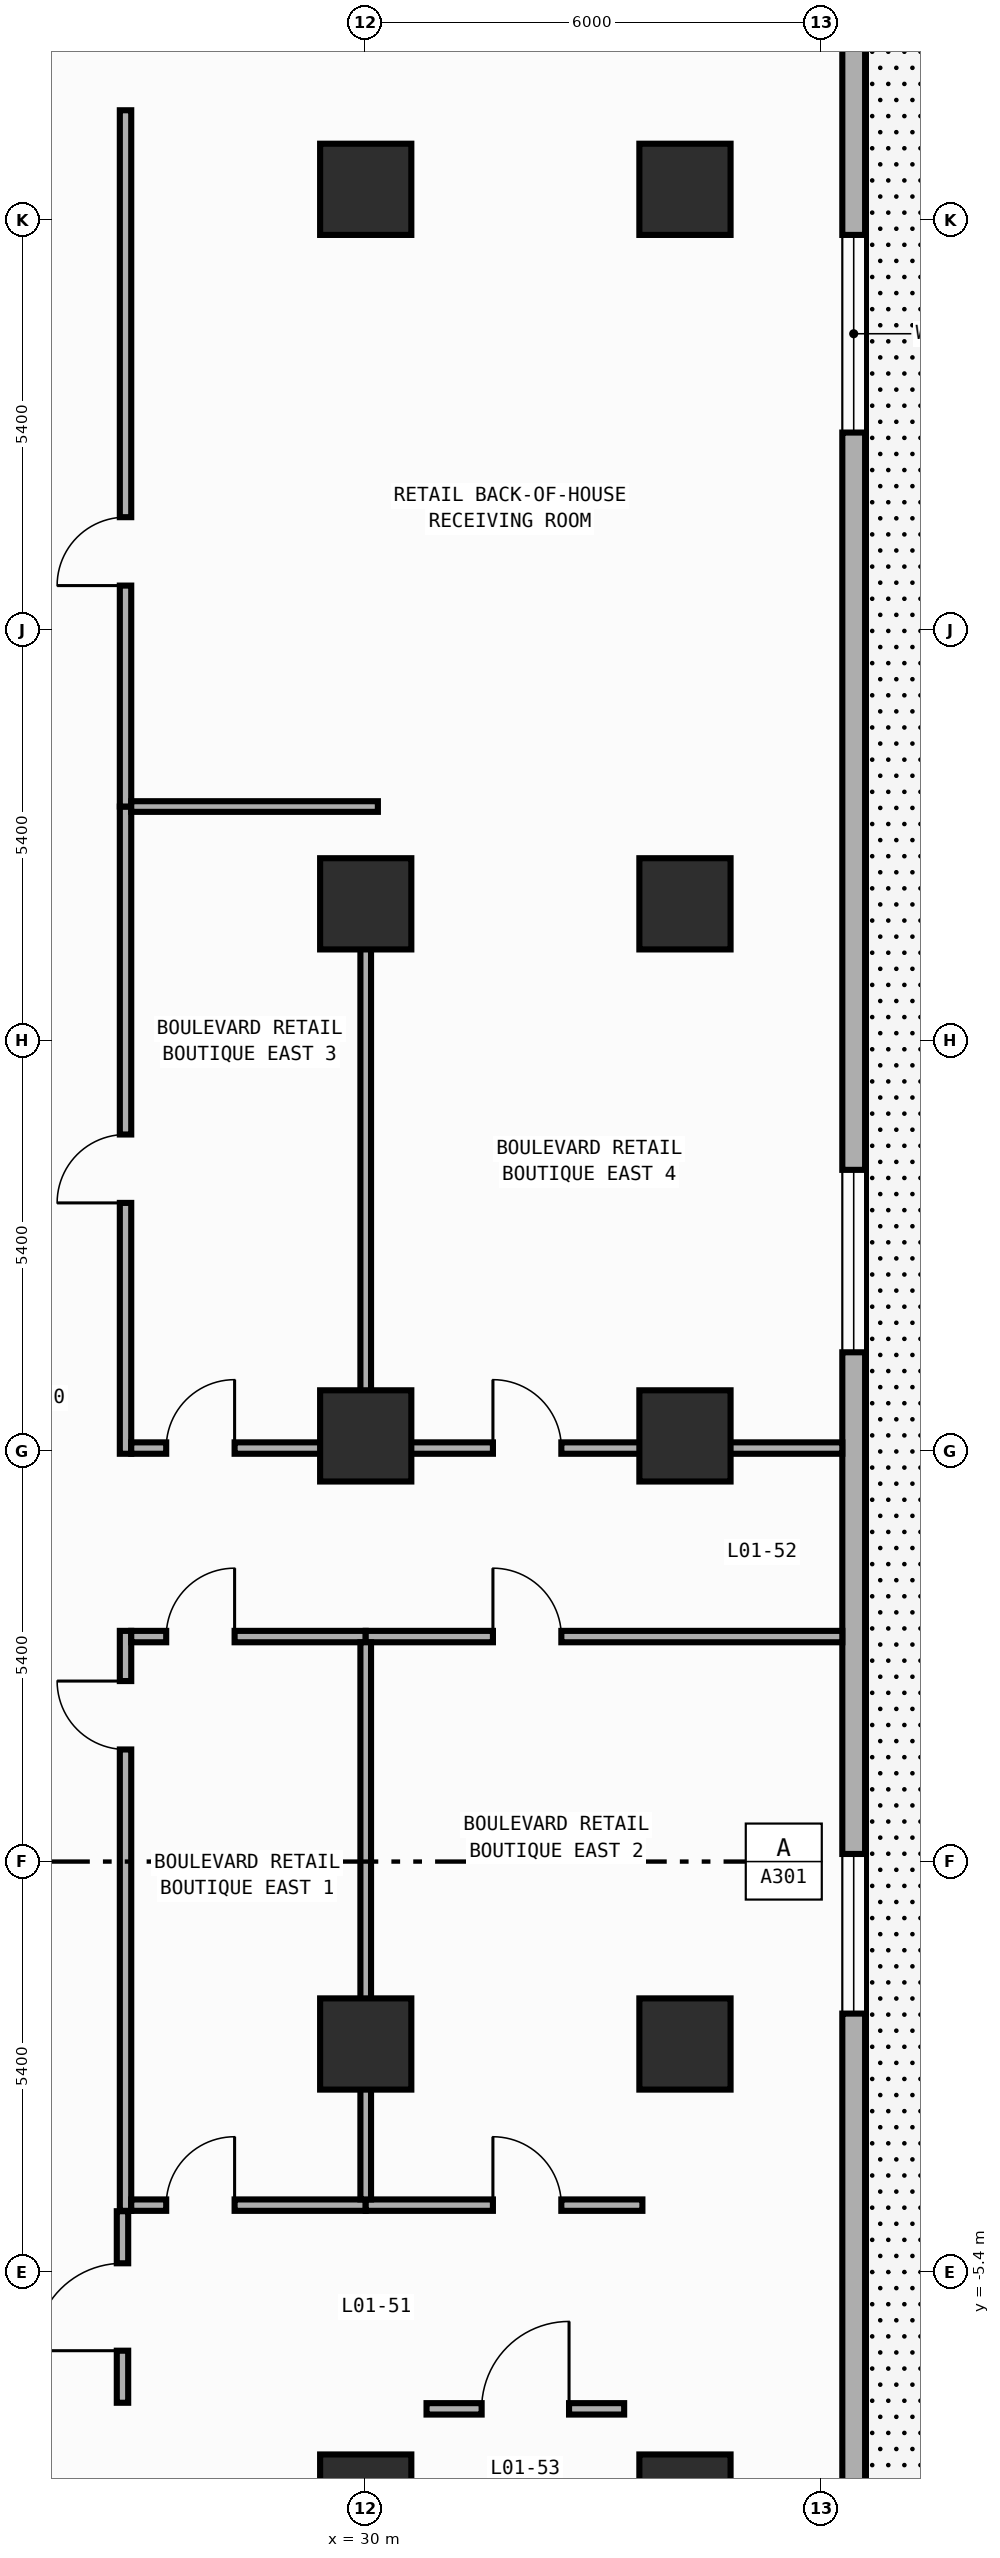
"""IFC4 building model, lengths in metres.
Left out: names, types, materials, properties, quantities, classifications, styles, units other than length and angle.
Written with IfcOpenShell. Run it as: python <this file> out.ifc"""

import sys

from ifc_helpers import new_model, si_unit, direction, frame, frame_2d, origin, origin_2d, place, context, subcontext, project, spatial, rectangle, extrude, element, fill, save


model = new_model("IFC4")
c1 = context("Model", 3, precision=1e-05, world=origin(), true_north=direction((0.0, 1.0)))
c2 = subcontext(c1, "Body", "Model", "MODEL_VIEW")
j1 = project(units=[si_unit("LENGTHUNIT", "METRE"), si_unit("PLANEANGLEUNIT", "RADIAN")], contexts=[c1])
p1 = place(None, origin())
s1 = spatial("IfcSite", under=j1, at=p1, CompositionType="ELEMENT")
p2 = place(p1, origin())
s2 = spatial("IfcBuilding", under=s1, at=p2, CompositionType="ELEMENT")
p3 = place(p2, origin())
s3 = spatial("IfcBuildingStorey", under=s2, at=p3, CompositionType="ELEMENT", Elevation=0.0)
for number, where, z_axis, x_axis in (
    (1, (30.0, -8.4, 0.0), (0.0, 0.0, 1.0), (1.0, 0.0, 0.0)),
    (2, (30.0, -2.4, 0.0), (0.0, 0.0, 1.0), (1.0, 0.0, 0.0)),
    (3, (30.0, 5.6, 0.0), (0.0, 0.0, 1.0), (1.0, 0.0, 0.0)),
    (4, (30.0, 12.6, 0.0), (0.0, 0.0, 1.0), (1.0, 0.0, 0.0)),
    (5, (30.0, 22.0, 0.0), (0.0, 0.0, 1.0), (1.0, 0.0, 0.0)),
    (6, (34.2, -8.4, 0.0), (0.0, 0.0, 1.0), (1.0, 0.0, 0.0)),
    (7, (34.2, -2.4, 0.0), (0.0, 0.0, 1.0), (1.0, 0.0, 0.0)),
    (8, (34.2, 5.6, 0.0), (0.0, 0.0, 1.0), (1.0, 0.0, 0.0)),
    (9, (34.2, 12.6, 0.0), (0.0, 0.0, 1.0), (1.0, 0.0, 0.0)),
    (10, (34.2, 22.0, 0.0), (0.0, 0.0, 1.0), (1.0, 0.0, 0.0)),
):
    element("IfcColumn", number, at=place(p3, frame(where, z_axis=z_axis, x_axis=x_axis)), inside=s3, PredefinedType="COLUMN", context=c2, shape_type="SweptSolid", body=[
        extrude(rectangle(XDim=1.2, YDim=1.2, at=origin_2d()), origin(), (0.0, 0.0, 1.0), 6.0),
    ])
p4 = place(p3, frame((36.42, 25.6, 0.0), z_axis=(0.0, 0.0, 1.0), x_axis=(0.0, -1.0, 0.0)))
e11 = element("IfcWall", 11, at=p4, inside=s3, PredefinedType="STANDARD", context=c2, shape_type="SweptSolid", body=[
    extrude(rectangle(XDim=51.2, YDim=0.3, at=frame_2d((25.6, 0.0))), origin(), (0.0, 0.0, 1.0), 5.7),
])
p5 = place(p4, frame((4.2, 0.0, 0.85)))
e12 = element("IfcOpeningElement", 12, at=p5, cuts=e11, PredefinedType="OPENING", context=c2, shape_type="SweptSolid", body=[
    extrude(rectangle(XDim=2.6, YDim=1.95, at=frame_2d((1.3, 0.975))), frame((0.0, 0.16, 0.0), z_axis=(0.0, -1.0, 0.0), x_axis=(1.0, 0.0, 0.0)), (0.0, 0.0, 1.0), 0.32),
])
p6 = place(p4, frame((16.5, 0.0, 0.85)))
e13 = element("IfcOpeningElement", 13, at=p6, cuts=e11, PredefinedType="OPENING", context=c2, shape_type="SweptSolid", body=[
    extrude(rectangle(XDim=2.4, YDim=2.5, at=frame_2d((1.2, 1.25))), frame((0.0, 0.16, 0.0), z_axis=(0.0, -1.0, 0.0), x_axis=(1.0, 0.0, 0.0)), (0.0, 0.0, 1.0), 0.32),
])
p7 = place(p4, frame((25.5, 0.0, 0.85)))
e14 = element("IfcOpeningElement", 14, at=p7, cuts=e11, PredefinedType="OPENING", context=c2, shape_type="SweptSolid", body=[
    extrude(rectangle(XDim=2.1, YDim=2.0, at=frame_2d((1.05, 1.0))), frame((0.0, 0.16, 0.0), z_axis=(0.0, -1.0, 0.0), x_axis=(1.0, 0.0, 0.0)), (0.0, 0.0, 1.0), 0.32),
])
p8 = place(p3, frame((30.8, -7.2, 0.0), z_axis=(0.0, 0.0, 1.0), x_axis=(1.0, 0.0, 0.0)))
e15 = element("IfcWall", 15, at=p8, inside=s3, PredefinedType="PARTITIONING", context=c2, shape_type="SweptSolid", body=[
    extrude(rectangle(XDim=2.6, YDim=0.15, at=frame_2d((1.3, 0.0))), origin(), (0.0, 0.0, 1.0), 5.7),
])
p9 = place(p8, frame((0.725, 0.0, 0.0)))
e16 = element("IfcOpeningElement", 16, at=p9, cuts=e15, PredefinedType="OPENING", context=c2, shape_type="SweptSolid", body=[
    extrude(rectangle(XDim=1.15, YDim=2.2, at=frame_2d((0.575, 1.1))), frame((0.0, 0.085, 0.0), z_axis=(0.0, -1.0, 0.0), x_axis=(1.0, 0.0, 0.0)), (0.0, 0.0, 1.0), 0.17),
])
p10 = place(p3, frame((26.8, -7.12, 0.0), z_axis=(0.0, 0.0, 1.0), x_axis=(0.0, 1.0, 0.0)))
e17 = element("IfcWall", 17, at=p10, inside=s3, PredefinedType="PARTITIONING", context=c2, shape_type="SweptSolid", body=[
    extrude(rectangle(XDim=2.52, YDim=0.15, at=frame_2d((1.26, 0.0))), origin(), (0.0, 0.0, 1.0), 5.7),
])
p11 = place(p10, frame((0.685, 0.0, 0.0)))
e18 = element("IfcOpeningElement", 18, at=p11, cuts=e17, PredefinedType="OPENING", context=c2, shape_type="SweptSolid", body=[
    extrude(rectangle(XDim=1.15, YDim=2.2, at=frame_2d((0.575, 1.1))), frame((0.0, 0.085, 0.0), z_axis=(0.0, -1.0, 0.0), x_axis=(1.0, 0.0, 0.0)), (0.0, 0.0, 1.0), 0.17),
])
p12 = place(p3, frame((26.84, -4.595, 0.0), z_axis=(0.0, 0.0, 1.0), x_axis=(0.0, 1.0, 0.0)))
e19 = element("IfcWall", 19, at=p12, inside=s3, PredefinedType="PARTITIONING", context=c2, shape_type="SweptSolid", body=[
    extrude(rectangle(XDim=7.63, YDim=0.15, at=frame_2d((3.815, 0.0))), origin(), (0.0, 0.0, 1.0), 5.7),
])
p13 = place(p12, frame((6.07, 0.0, 0.0)))
e20 = element("IfcOpeningElement", 20, at=p13, cuts=e19, PredefinedType="OPENING", context=c2, shape_type="SweptSolid", body=[
    extrude(rectangle(XDim=0.9, YDim=2.15, at=frame_2d((0.45, 1.075))), frame((0.0, 0.085, 0.0), z_axis=(0.0, -1.0, 0.0), x_axis=(1.0, 0.0, 0.0)), (0.0, 0.0, 1.0), 0.17),
])
p14 = place(p3, frame((26.84, 5.365, 0.0), z_axis=(0.0, 0.0, 1.0), x_axis=(0.0, 1.0, 0.0)))
e21 = element("IfcWall", 21, at=p14, inside=s3, PredefinedType="PARTITIONING", context=c2, shape_type="SweptSolid", body=[
    extrude(rectangle(XDim=8.515, YDim=0.15, at=frame_2d((4.257, 0.0))), origin(), (0.0, 0.0, 1.0), 5.7),
])
p15 = place(p14, frame((3.3, 0.0, 0.0)))
e22 = element("IfcOpeningElement", 22, at=p15, cuts=e21, PredefinedType="OPENING", context=c2, shape_type="SweptSolid", body=[
    extrude(rectangle(XDim=0.9, YDim=2.15, at=frame_2d((0.45, 1.075))), frame((0.0, 0.085, 0.0), z_axis=(0.0, -1.0, 0.0), x_axis=(1.0, 0.0, 0.0)), (0.0, 0.0, 1.0), 0.17),
])
p16 = place(p3, frame((26.84, 13.88, 0.0), z_axis=(0.0, 0.0, 1.0), x_axis=(0.0, 1.0, 0.0)))
e23 = element("IfcWall", 23, at=p16, inside=s3, PredefinedType="PARTITIONING", context=c2, shape_type="SweptSolid", body=[
    extrude(rectangle(XDim=9.16, YDim=0.15, at=frame_2d((4.58, 0.0))), origin(), (0.0, 0.0, 1.0), 5.7),
])
p17 = place(p16, frame((2.907, 0.0, 0.0)))
e24 = element("IfcOpeningElement", 24, at=p17, cuts=e23, PredefinedType="OPENING", context=c2, shape_type="SweptSolid", body=[
    extrude(rectangle(XDim=0.9, YDim=2.15, at=frame_2d((0.45, 1.075))), frame((0.0, 0.085, 0.0), z_axis=(0.0, -1.0, 0.0), x_axis=(1.0, 0.0, 0.0)), (0.0, 0.0, 1.0), 0.17),
])
p18 = place(p3, frame((26.915, -4.52, 0.0), z_axis=(0.0, 0.0, 1.0), x_axis=(1.0, 0.0, 0.0)))
e25 = element("IfcWall", 25, at=p18, inside=s3, PredefinedType="PARTITIONING", context=c2, shape_type="SweptSolid", body=[
    extrude(rectangle(XDim=3.085, YDim=0.15, at=frame_2d((1.542, 0.0))), origin(), (0.0, 0.0, 1.0), 5.7),
])
p19 = place(p18, frame((0.46, 0.0, 0.0)))
e26 = element("IfcOpeningElement", 26, at=p19, cuts=e25, PredefinedType="OPENING", context=c2, shape_type="SweptSolid", body=[
    extrude(rectangle(XDim=0.9, YDim=2.15, at=frame_2d((0.45, 1.075))), frame((0.0, 0.085, 0.0), z_axis=(0.0, -1.0, 0.0), x_axis=(1.0, 0.0, 0.0)), (0.0, 0.0, 1.0), 0.17),
])
p20 = place(p3, frame((30.0, -4.52, 0.0), z_axis=(0.0, 0.0, 1.0), x_axis=(1.0, 0.0, 0.0)))
e27 = element("IfcWall", 27, at=p20, inside=s3, PredefinedType="PARTITIONING", context=c2, shape_type="SweptSolid", body=[
    extrude(rectangle(XDim=3.64, YDim=0.15, at=frame_2d((1.82, 0.0))), origin(), (0.0, 0.0, 1.0), 5.7),
])
p21 = place(p20, frame((1.673, 0.0, 0.0)))
e28 = element("IfcOpeningElement", 28, at=p21, cuts=e27, PredefinedType="OPENING", context=c2, shape_type="SweptSolid", body=[
    extrude(rectangle(XDim=0.9, YDim=2.15, at=frame_2d((0.45, 1.075))), frame((0.0, 0.085, 0.0), z_axis=(0.0, -1.0, 0.0), x_axis=(1.0, 0.0, 0.0)), (0.0, 0.0, 1.0), 0.17),
])
p22 = place(p3, frame((26.915, 2.96, 0.0), z_axis=(0.0, 0.0, 1.0), x_axis=(1.0, 0.0, 0.0)))
e29 = element("IfcWall", 29, at=p22, inside=s3, PredefinedType="PARTITIONING", context=c2, shape_type="SweptSolid", body=[
    extrude(rectangle(XDim=3.085, YDim=0.15, at=frame_2d((1.542, 0.0))), origin(), (0.0, 0.0, 1.0), 5.7),
])
p23 = place(p22, frame((0.46, 0.0, 0.0)))
e30 = element("IfcOpeningElement", 30, at=p23, cuts=e29, PredefinedType="OPENING", context=c2, shape_type="SweptSolid", body=[
    extrude(rectangle(XDim=0.9, YDim=2.15, at=frame_2d((0.45, 1.075))), frame((0.0, 0.085, 0.0), z_axis=(0.0, -1.0, 0.0), x_axis=(1.0, 0.0, 0.0)), (0.0, 0.0, 1.0), 0.17),
])
p24 = place(p3, frame((30.0, 2.96, 0.0), z_axis=(0.0, 0.0, 1.0), x_axis=(1.0, 0.0, 0.0)))
e31 = element("IfcWall", 31, at=p24, inside=s3, PredefinedType="PARTITIONING", context=c2, shape_type="SweptSolid", body=[
    extrude(rectangle(XDim=6.27, YDim=0.15, at=frame_2d((3.135, 0.0))), origin(), (0.0, 0.0, 1.0), 5.7),
])
p25 = place(p24, frame((1.674, 0.0, 0.0)))
e32 = element("IfcOpeningElement", 32, at=p25, cuts=e31, PredefinedType="OPENING", context=c2, shape_type="SweptSolid", body=[
    extrude(rectangle(XDim=0.9, YDim=2.15, at=frame_2d((0.45, 1.075))), frame((0.0, 0.085, 0.0), z_axis=(0.0, -1.0, 0.0), x_axis=(1.0, 0.0, 0.0)), (0.0, 0.0, 1.0), 0.17),
])
p26 = place(p3, frame((26.915, 5.44, 0.0), z_axis=(0.0, 0.0, 1.0), x_axis=(1.0, 0.0, 0.0)))
e33 = element("IfcWall", 33, at=p26, inside=s3, PredefinedType="PARTITIONING", context=c2, shape_type="SweptSolid", body=[
    extrude(rectangle(XDim=3.085, YDim=0.15, at=frame_2d((1.542, 0.0))), origin(), (0.0, 0.0, 1.0), 4.8),
])
p27 = place(p26, frame((0.46, 0.0, 0.0)))
e34 = element("IfcOpeningElement", 34, at=p27, cuts=e33, PredefinedType="OPENING", context=c2, shape_type="SweptSolid", body=[
    extrude(rectangle(XDim=0.9, YDim=2.15, at=frame_2d((0.45, 1.075))), frame((0.0, 0.085, 0.0), z_axis=(0.0, -1.0, 0.0), x_axis=(1.0, 0.0, 0.0)), (0.0, 0.0, 1.0), 0.17),
])
p28 = place(p3, frame((30.0, 5.44, 0.0), z_axis=(0.0, 0.0, 1.0), x_axis=(1.0, 0.0, 0.0)))
e35 = element("IfcWall", 35, at=p28, inside=s3, PredefinedType="PARTITIONING", context=c2, shape_type="SweptSolid", body=[
    extrude(rectangle(XDim=6.27, YDim=0.15, at=frame_2d((3.135, 0.0))), origin(), (0.0, 0.0, 1.0), 4.8),
])
p29 = place(p28, frame((1.674, 0.0, 0.0)))
e36 = element("IfcOpeningElement", 36, at=p29, cuts=e35, PredefinedType="OPENING", context=c2, shape_type="SweptSolid", body=[
    extrude(rectangle(XDim=0.9, YDim=2.15, at=frame_2d((0.45, 1.075))), frame((0.0, 0.085, 0.0), z_axis=(0.0, -1.0, 0.0), x_axis=(1.0, 0.0, 0.0)), (0.0, 0.0, 1.0), 0.17),
])
p30 = place(p3, frame((30.0, -4.445, 0.0), z_axis=(0.0, 0.0, 1.0), x_axis=(0.0, 1.0, 0.0)))
e37 = element("IfcWall", 37, at=p30, inside=s3, PredefinedType="PARTITIONING", context=c2, shape_type="SweptSolid", body=[
    extrude(rectangle(XDim=7.33, YDim=0.14, at=frame_2d((3.665, 0.0))), origin(), (0.0, 0.0, 1.0), 4.8),
])
p31 = place(p3, frame((30.0, 5.515, 0.0), z_axis=(0.0, 0.0, 1.0), x_axis=(0.0, 1.0, 0.0)))
e38 = element("IfcWall", 38, at=p31, inside=s3, PredefinedType="PARTITIONING", context=c2, shape_type="SweptSolid", body=[
    extrude(rectangle(XDim=7.245, YDim=0.14, at=frame_2d((3.623, 0.0))), origin(), (0.0, 0.0, 1.0), 4.8),
])
p32 = place(p3, frame((26.915, 13.88, 0.0), z_axis=(0.0, 0.0, 1.0), x_axis=(1.0, 0.0, 0.0)))
e39 = element("IfcWall", 39, at=p32, inside=s3, PredefinedType="PARTITIONING", context=c2, shape_type="SweptSolid", body=[
    extrude(rectangle(XDim=3.245, YDim=0.14, at=frame_2d((1.623, 0.0))), origin(), (0.0, 0.0, 1.0), 5.7),
])
p33 = place(p5, origin())
e40 = element("IfcWindow", 40, at=p33, inside=s3, PartitioningType="SINGLE_PANEL", PredefinedType="WINDOW", context=c2, shape_type="SweptSolid", body=[
    extrude(rectangle(XDim=2.6, YDim=1.95, at=frame_2d((1.3, 0.975))), frame((0.0, 0.03, 0.0), z_axis=(0.0, -1.0, 0.0), x_axis=(1.0, 0.0, 0.0)), (0.0, 0.0, 1.0), 0.06),
])
fill(e12, e40)
p34 = place(p6, origin())
e41 = element("IfcWindow", 41, at=p34, inside=s3, PartitioningType="SINGLE_PANEL", PredefinedType="WINDOW", context=c2, shape_type="SweptSolid", body=[
    extrude(rectangle(XDim=2.4, YDim=2.5, at=frame_2d((1.2, 1.25))), frame((0.0, 0.03, 0.0), z_axis=(0.0, -1.0, 0.0), x_axis=(1.0, 0.0, 0.0)), (0.0, 0.0, 1.0), 0.06),
])
fill(e13, e41)
p35 = place(p7, origin())
e42 = element("IfcWindow", 42, at=p35, inside=s3, PartitioningType="SINGLE_PANEL", PredefinedType="WINDOW", context=c2, shape_type="SweptSolid", body=[
    extrude(rectangle(XDim=2.1, YDim=2.0, at=frame_2d((1.05, 1.0))), frame((0.0, 0.03, 0.0), z_axis=(0.0, -1.0, 0.0), x_axis=(1.0, 0.0, 0.0)), (0.0, 0.0, 1.0), 0.06),
])
fill(e14, e42)
p36 = place(p9, origin())
e43 = element("IfcDoor", 43, at=p36, inside=s3, OperationType="SINGLE_SWING_RIGHT", PredefinedType="DOOR", context=c2, shape_type="SweptSolid", body=[
    extrude(rectangle(XDim=1.15, YDim=2.2, at=frame_2d((0.575, 1.1))), frame((0.0, 0.025, 0.0), z_axis=(0.0, -1.0, 0.0), x_axis=(1.0, 0.0, 0.0)), (0.0, 0.0, 1.0), 0.05),
])
fill(e16, e43)
p37 = place(p11, origin())
e44 = element("IfcDoor", 44, at=p37, inside=s3, OperationType="SINGLE_SWING_LEFT", PredefinedType="DOOR", context=c2, shape_type="SweptSolid", body=[
    extrude(rectangle(XDim=1.15, YDim=2.2, at=frame_2d((0.575, 1.1))), frame((0.0, 0.025, 0.0), z_axis=(0.0, -1.0, 0.0), x_axis=(1.0, 0.0, 0.0)), (0.0, 0.0, 1.0), 0.05),
])
fill(e18, e44)
p38 = place(p13, origin())
e45 = element("IfcDoor", 45, at=p38, inside=s3, OperationType="SINGLE_SWING_RIGHT", PredefinedType="DOOR", context=c2, shape_type="SweptSolid", body=[
    extrude(rectangle(XDim=0.9, YDim=2.15, at=frame_2d((0.45, 1.075))), frame((0.0, 0.025, 0.0), z_axis=(0.0, -1.0, 0.0), x_axis=(1.0, 0.0, 0.0)), (0.0, 0.0, 1.0), 0.05),
])
fill(e20, e45)
p39 = place(p15, origin())
e46 = element("IfcDoor", 46, at=p39, inside=s3, OperationType="SINGLE_SWING_LEFT", PredefinedType="DOOR", context=c2, shape_type="SweptSolid", body=[
    extrude(rectangle(XDim=0.9, YDim=2.15, at=frame_2d((0.45, 1.075))), frame((0.0, 0.025, 0.0), z_axis=(0.0, -1.0, 0.0), x_axis=(1.0, 0.0, 0.0)), (0.0, 0.0, 1.0), 0.05),
])
fill(e22, e46)
p40 = place(p17, origin())
e47 = element("IfcDoor", 47, at=p40, inside=s3, OperationType="SINGLE_SWING_LEFT", PredefinedType="DOOR", context=c2, shape_type="SweptSolid", body=[
    extrude(rectangle(XDim=0.9, YDim=2.15, at=frame_2d((0.45, 1.075))), frame((0.0, 0.025, 0.0), z_axis=(0.0, -1.0, 0.0), x_axis=(1.0, 0.0, 0.0)), (0.0, 0.0, 1.0), 0.05),
])
fill(e24, e47)
p41 = place(p19, origin())
e48 = element("IfcDoor", 48, at=p41, inside=s3, OperationType="SINGLE_SWING_RIGHT", PredefinedType="DOOR", context=c2, shape_type="SweptSolid", body=[
    extrude(rectangle(XDim=0.9, YDim=2.15, at=frame_2d((0.45, 1.075))), frame((0.0, 0.025, 0.0), z_axis=(0.0, -1.0, 0.0), x_axis=(1.0, 0.0, 0.0)), (0.0, 0.0, 1.0), 0.05),
])
fill(e26, e48)
p42 = place(p21, origin())
e49 = element("IfcDoor", 49, at=p42, inside=s3, OperationType="SINGLE_SWING_LEFT", PredefinedType="DOOR", context=c2, shape_type="SweptSolid", body=[
    extrude(rectangle(XDim=0.9, YDim=2.15, at=frame_2d((0.45, 1.075))), frame((0.0, 0.025, 0.0), z_axis=(0.0, -1.0, 0.0), x_axis=(1.0, 0.0, 0.0)), (0.0, 0.0, 1.0), 0.05),
])
fill(e28, e49)
p43 = place(p23, origin())
e50 = element("IfcDoor", 50, at=p43, inside=s3, OperationType="SINGLE_SWING_RIGHT", PredefinedType="DOOR", context=c2, shape_type="SweptSolid", body=[
    extrude(rectangle(XDim=0.9, YDim=2.15, at=frame_2d((0.45, 1.075))), frame((0.0, 0.025, 0.0), z_axis=(0.0, -1.0, 0.0), x_axis=(1.0, 0.0, 0.0)), (0.0, 0.0, 1.0), 0.05),
])
fill(e30, e50)
p44 = place(p25, origin())
e51 = element("IfcDoor", 51, at=p44, inside=s3, OperationType="SINGLE_SWING_LEFT", PredefinedType="DOOR", context=c2, shape_type="SweptSolid", body=[
    extrude(rectangle(XDim=0.9, YDim=2.15, at=frame_2d((0.45, 1.075))), frame((0.0, 0.025, 0.0), z_axis=(0.0, -1.0, 0.0), x_axis=(1.0, 0.0, 0.0)), (0.0, 0.0, 1.0), 0.05),
])
fill(e32, e51)
p45 = place(p27, origin())
e52 = element("IfcDoor", 52, at=p45, inside=s3, OperationType="SINGLE_SWING_RIGHT", PredefinedType="DOOR", context=c2, shape_type="SweptSolid", body=[
    extrude(rectangle(XDim=0.9, YDim=2.15, at=frame_2d((0.45, 1.075))), frame((0.0, 0.025, 0.0), z_axis=(0.0, -1.0, 0.0), x_axis=(1.0, 0.0, 0.0)), (0.0, 0.0, 1.0), 0.05),
])
fill(e34, e52)
p46 = place(p29, origin())
e53 = element("IfcDoor", 53, at=p46, inside=s3, OperationType="SINGLE_SWING_LEFT", PredefinedType="DOOR", context=c2, shape_type="SweptSolid", body=[
    extrude(rectangle(XDim=0.9, YDim=2.15, at=frame_2d((0.45, 1.075))), frame((0.0, 0.025, 0.0), z_axis=(0.0, -1.0, 0.0), x_axis=(1.0, 0.0, 0.0)), (0.0, 0.0, 1.0), 0.05),
])
fill(e36, e53)
save(model, sys.argv[1])
